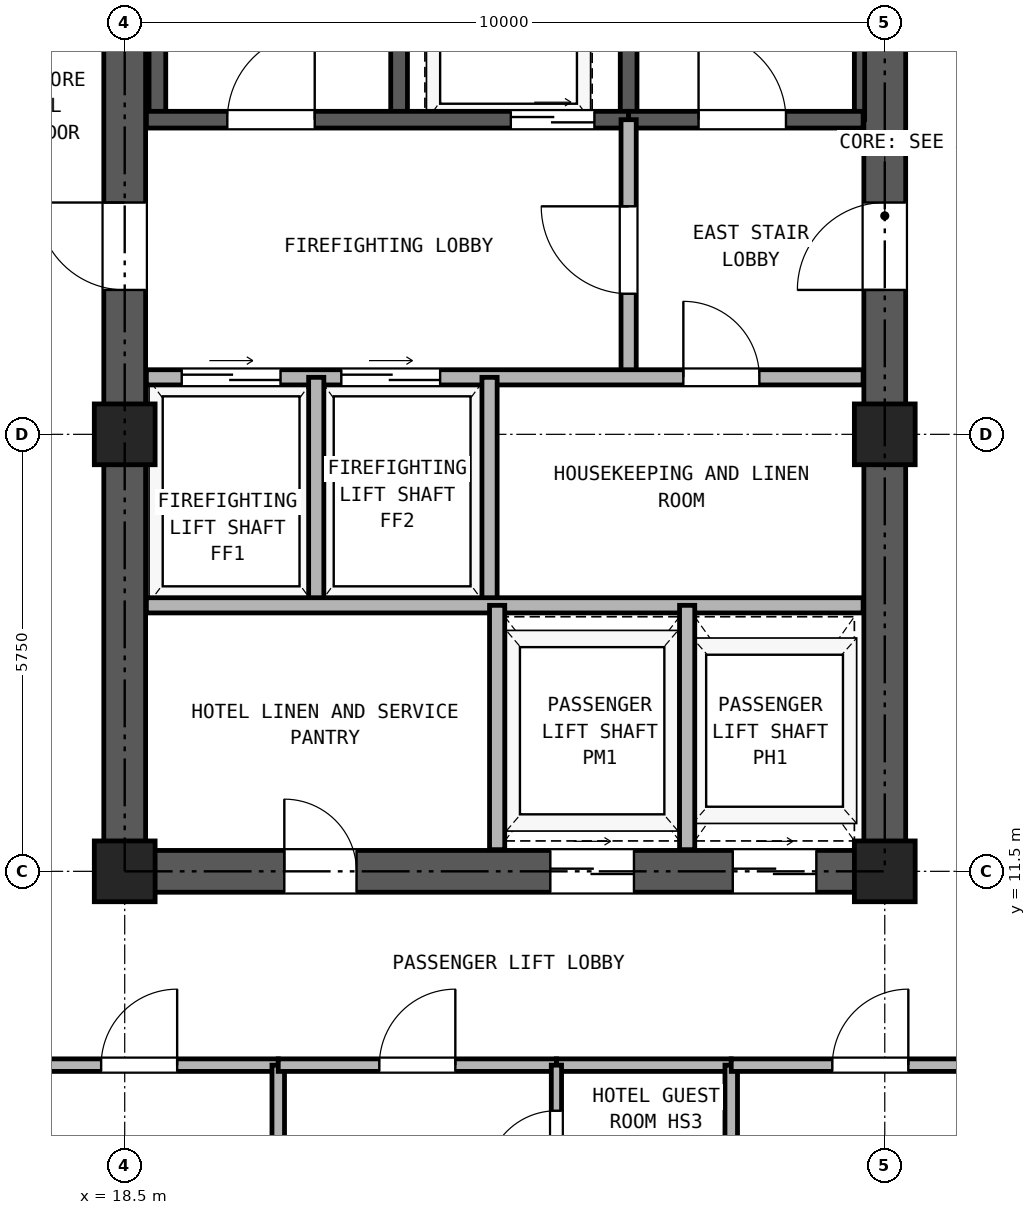
"""IFC4 building model, lengths in metres.
Left out: names, types, materials, properties, quantities, classifications, styles, units other than length and angle.
Written with IfcOpenShell. Run it as: python <this file> out.ifc"""

import sys

from ifc_helpers import new_model, si_unit, direction, frame, frame_2d, origin, origin_2d, place, context, subcontext, project, spatial, rectangle, hollow_rectangle, extrude, source, transform, mapped, element, fill, save


model = new_model("IFC4")
c1 = context("Model", 3, precision=1e-05, world=origin(), true_north=direction((0.0, 1.0)))
c2 = subcontext(c1, "Body", "Model", "MODEL_VIEW")
j1 = project(units=[si_unit("LENGTHUNIT", "METRE"), si_unit("PLANEANGLEUNIT", "RADIAN")], contexts=[c1])
p1 = place(None, origin())
s1 = spatial("IfcSite", under=j1, at=p1, CompositionType="ELEMENT")
p2 = place(p1, origin())
s2 = spatial("IfcBuilding", under=s1, at=p2, CompositionType="ELEMENT")
p3 = place(p2, frame((0.0, 0.0, 115.1)))
s3 = spatial("IfcBuildingStorey", under=s2, at=p3, CompositionType="ELEMENT", Elevation=115.1)
m1 = source(origin(), c2, "Body", "SweptSolid", [
    extrude(hollow_rectangle(XDim=0.8, YDim=0.8, WallThickness=0.045, at=origin_2d()), origin(), (0.0, 0.0, 1.0), 2.95),
])
for number, where, z_axis, x_axis in (
    (1, (18.5, 11.5, 0.0), (0.0, 0.0, 1.0), (1.0, 0.0, 0.0)),
    (2, (18.5, 17.25, 0.0), (0.0, 0.0, 1.0), (1.0, 0.0, 0.0)),
    (3, (28.5, 11.5, 0.0), (0.0, 0.0, 1.0), (1.0, 0.0, 0.0)),
    (4, (28.5, 17.25, 0.0), (0.0, 0.0, 1.0), (1.0, 0.0, 0.0)),
):
    element("IfcColumn", number, at=place(p3, frame(where, z_axis=z_axis, x_axis=x_axis)), inside=s3, PredefinedType="COLUMN", context=c2, shape_type="MappedRepresentation", body=[
        mapped(m1, transform((0.0, 0.0, 0.0), x_axis=(1.0, 0.0, 0.0), y_axis=(0.0, 1.0, 0.0), z_axis=(0.0, 0.0, 1.0), scale=1.0)),
    ])
p4 = place(p3, frame((18.225, 11.5, 0.0), z_axis=(0.0, 0.0, 1.0), x_axis=(1.0, 0.0, 0.0)))
e5 = element("IfcWall", 5, at=p4, inside=s3, PredefinedType="SHEAR", context=c2, shape_type="SweptSolid", body=[
    extrude(rectangle(XDim=10.55, YDim=0.55, at=frame_2d((5.275, 0.0))), origin(), (0.0, 0.0, 1.0), 2.95),
])
p5 = place(p4, frame((2.375, 0.0, 0.0)))
e6 = element("IfcOpeningElement", 6, at=p5, cuts=e5, PredefinedType="OPENING", context=c2, shape_type="SweptSolid", body=[
    extrude(rectangle(XDim=0.95, YDim=2.15, at=frame_2d((0.475, 1.075))), frame((0.0, 0.285, 0.0), z_axis=(0.0, -1.0, 0.0), x_axis=(1.0, 0.0, 0.0)), (0.0, 0.0, 1.0), 0.57),
])
p6 = place(p4, frame((5.875, 0.0, 0.0)))
e7 = element("IfcOpeningElement", 7, at=p6, cuts=e5, PredefinedType="OPENING", context=c2, shape_type="SweptSolid", body=[
    extrude(rectangle(XDim=1.1, YDim=2.25, at=frame_2d((0.55, 1.125))), frame((0.0, 0.285, 0.0), z_axis=(0.0, -1.0, 0.0), x_axis=(1.0, 0.0, 0.0)), (0.0, 0.0, 1.0), 0.57),
])
p7 = place(p4, frame((8.275, 0.0, 0.0)))
e8 = element("IfcOpeningElement", 8, at=p7, cuts=e5, PredefinedType="OPENING", context=c2, shape_type="SweptSolid", body=[
    extrude(rectangle(XDim=1.1, YDim=2.25, at=frame_2d((0.55, 1.125))), frame((0.0, 0.285, 0.0), z_axis=(0.0, -1.0, 0.0), x_axis=(1.0, 0.0, 0.0)), (0.0, 0.0, 1.0), 0.57),
])
p8 = place(p3, frame((18.5, 11.775, 0.0), z_axis=(0.0, 0.0, 1.0), x_axis=(0.0, 1.0, 0.0)))
e9 = element("IfcWall", 9, at=p8, inside=s3, PredefinedType="SHEAR", context=c2, shape_type="SweptSolid", body=[
    extrude(rectangle(XDim=16.7, YDim=0.55, at=frame_2d((8.35, 0.0))), origin(), (0.0, 0.0, 1.0), 2.95),
])
p9 = place(p8, frame((7.375, 0.0, 0.0)))
e10 = element("IfcOpeningElement", 10, at=p9, cuts=e9, PredefinedType="OPENING", context=c2, shape_type="SweptSolid", body=[
    extrude(rectangle(XDim=1.15, YDim=2.2, at=frame_2d((0.575, 1.1))), frame((0.0, 0.285, 0.0), z_axis=(0.0, -1.0, 0.0), x_axis=(1.0, 0.0, 0.0)), (0.0, 0.0, 1.0), 0.57),
])
p10 = place(p3, frame((28.5, 11.775, 0.0), z_axis=(0.0, 0.0, 1.0), x_axis=(0.0, 1.0, 0.0)))
e11 = element("IfcWall", 11, at=p10, inside=s3, PredefinedType="SHEAR", context=c2, shape_type="SweptSolid", body=[
    extrude(rectangle(XDim=16.7, YDim=0.55, at=frame_2d((8.35, 0.0))), origin(), (0.0, 0.0, 1.0), 2.95),
])
p11 = place(p10, frame((7.375, 0.0, 0.0)))
e12 = element("IfcOpeningElement", 12, at=p11, cuts=e11, PredefinedType="OPENING", context=c2, shape_type="SweptSolid", body=[
    extrude(rectangle(XDim=1.15, YDim=2.2, at=frame_2d((0.575, 1.1))), frame((0.0, 0.285, 0.0), z_axis=(0.0, -1.0, 0.0), x_axis=(1.0, 0.0, 0.0)), (0.0, 0.0, 1.0), 0.57),
])
for number, where, z_axis, x_axis in (
    (13, (18.93, 21.39, 0.0), (0.0, 0.0, 1.0), (0.0, 1.0, 0.0)),
    (14, (22.11, 21.39, 0.0), (0.0, 0.0, 1.0), (0.0, 1.0, 0.0)),
    (15, (25.13, 21.39, 0.0), (0.0, 0.0, 1.0), (0.0, 1.0, 0.0)),
):
    element("IfcWall", number, at=place(p3, frame(where, z_axis=z_axis, x_axis=x_axis)), inside=s3, PredefinedType="SOLIDWALL", context=c2, shape_type="SweptSolid", body=[
        extrude(rectangle(XDim=7.11, YDim=0.22, at=frame_2d((3.555, 0.0))), origin(), (0.0, 0.0, 1.0), 2.95),
    ])
p12 = place(p3, frame((28.167, 21.39, 0.0), z_axis=(0.0, 0.0, 1.0), x_axis=(0.0, 1.0, 0.0)))
e16 = element("IfcWall", 16, at=p12, inside=s3, PredefinedType="PARTITIONING", context=c2, shape_type="SweptSolid", body=[
    extrude(rectangle(XDim=6.945, YDim=0.135, at=frame_2d((3.473, 0.0))), origin(), (0.0, 0.0, 1.0), 2.95),
])
p13 = place(p3, frame((18.785, 21.39, 0.0), z_axis=(0.0, 0.0, 1.0), x_axis=(1.0, 0.0, 0.0)))
e17 = element("IfcWall", 17, at=p13, inside=s3, PredefinedType="SOLIDWALL", context=c2, shape_type="SweptSolid", body=[
    extrude(rectangle(XDim=6.345, YDim=0.22, at=frame_2d((3.172, 0.0))), origin(), (0.0, 0.0, 1.0), 2.95),
])
p14 = place(p13, frame((1.065, 0.0, 0.0)))
e18 = element("IfcOpeningElement", 18, at=p14, cuts=e17, PredefinedType="OPENING", context=c2, shape_type="SweptSolid", body=[
    extrude(rectangle(XDim=1.15, YDim=2.2, at=frame_2d((0.575, 1.1))), frame((0.0, 0.12, 0.0), z_axis=(0.0, -1.0, 0.0), x_axis=(1.0, 0.0, 0.0)), (0.0, 0.0, 1.0), 0.24),
])
p15 = place(p13, frame((4.795, 0.0, 0.0)))
e19 = element("IfcOpeningElement", 19, at=p15, cuts=e17, PredefinedType="OPENING", context=c2, shape_type="SweptSolid", body=[
    extrude(rectangle(XDim=1.1, YDim=2.25, at=frame_2d((0.55, 1.125))), frame((0.0, 0.12, 0.0), z_axis=(0.0, -1.0, 0.0), x_axis=(1.0, 0.0, 0.0)), (0.0, 0.0, 1.0), 0.24),
])
p16 = place(p3, frame((25.13, 21.39, 0.0), z_axis=(0.0, 0.0, 1.0), x_axis=(1.0, 0.0, 0.0)))
e20 = element("IfcWall", 20, at=p16, inside=s3, PredefinedType="SOLIDWALL", context=c2, shape_type="SweptSolid", body=[
    extrude(rectangle(XDim=3.085, YDim=0.22, at=frame_2d((1.542, 0.0))), origin(), (0.0, 0.0, 1.0), 2.95),
])
p17 = place(p16, frame((0.92, 0.0, 0.0)))
e21 = element("IfcOpeningElement", 21, at=p17, cuts=e20, PredefinedType="OPENING", context=c2, shape_type="SweptSolid", body=[
    extrude(rectangle(XDim=1.15, YDim=2.2, at=frame_2d((0.575, 1.1))), frame((0.0, 0.12, 0.0), z_axis=(0.0, -1.0, 0.0), x_axis=(1.0, 0.0, 0.0)), (0.0, 0.0, 1.0), 0.24),
])
p18 = place(p3, frame((25.13, 18.0, 0.0), z_axis=(0.0, 0.0, 1.0), x_axis=(0.0, 1.0, 0.0)))
e22 = element("IfcWall", 22, at=p18, inside=s3, PredefinedType="PARTITIONING", context=c2, shape_type="SweptSolid", body=[
    extrude(rectangle(XDim=3.39, YDim=0.2, at=frame_2d((1.695, 0.0))), origin(), (0.0, 0.0, 1.0), 2.95),
])
p19 = place(p18, frame((1.1, 0.0, 0.0)))
e23 = element("IfcOpeningElement", 23, at=p19, cuts=e22, PredefinedType="OPENING", context=c2, shape_type="SweptSolid", body=[
    extrude(rectangle(XDim=1.15, YDim=2.2, at=frame_2d((0.575, 1.1))), frame((0.0, 0.11, 0.0), z_axis=(0.0, -1.0, 0.0), x_axis=(1.0, 0.0, 0.0)), (0.0, 0.0, 1.0), 0.22),
])
p20 = place(p3, frame((18.785, 18.0, 0.0), z_axis=(0.0, 0.0, 1.0), x_axis=(1.0, 0.0, 0.0)))
e24 = element("IfcWall", 24, at=p20, inside=s3, PredefinedType="PARTITIONING", context=c2, shape_type="SweptSolid", body=[
    extrude(rectangle(XDim=9.43, YDim=0.2, at=frame_2d((4.715, 0.0))), origin(), (0.0, 0.0, 1.0), 2.95),
])
p21 = place(p20, frame((0.465, 0.0, 0.0)))
e25 = element("IfcOpeningElement", 25, at=p21, cuts=e24, PredefinedType="OPENING", context=c2, shape_type="SweptSolid", body=[
    extrude(rectangle(XDim=1.3, YDim=2.3, at=frame_2d((0.65, 1.15))), frame((0.0, 0.11, 0.0), z_axis=(0.0, -1.0, 0.0), x_axis=(1.0, 0.0, 0.0)), (0.0, 0.0, 1.0), 0.22),
])
p22 = place(p20, frame((2.565, 0.0, 0.0)))
e26 = element("IfcOpeningElement", 26, at=p22, cuts=e24, PredefinedType="OPENING", context=c2, shape_type="SweptSolid", body=[
    extrude(rectangle(XDim=1.3, YDim=2.3, at=frame_2d((0.65, 1.15))), frame((0.0, 0.11, 0.0), z_axis=(0.0, -1.0, 0.0), x_axis=(1.0, 0.0, 0.0)), (0.0, 0.0, 1.0), 0.22),
])
p23 = place(p20, frame((7.065, 0.0, 0.0)))
e27 = element("IfcOpeningElement", 27, at=p23, cuts=e24, PredefinedType="OPENING", context=c2, shape_type="SweptSolid", body=[
    extrude(rectangle(XDim=1.0, YDim=2.15, at=frame_2d((0.5, 1.075))), frame((0.0, 0.11, 0.0), z_axis=(0.0, -1.0, 0.0), x_axis=(1.0, 0.0, 0.0)), (0.0, 0.0, 1.0), 0.22),
])
for number, where, z_axis, x_axis in (
    (28, (21.02, 15.0, 0.0), (0.0, 0.0, 1.0), (0.0, 1.0, 0.0)),
    (29, (23.3, 15.0, 0.0), (0.0, 0.0, 1.0), (0.0, 1.0, 0.0)),
):
    element("IfcWall", number, at=place(p3, frame(where, z_axis=z_axis, x_axis=x_axis)), inside=s3, PredefinedType="PARTITIONING", context=c2, shape_type="SweptSolid", body=[
        extrude(rectangle(XDim=3.0, YDim=0.2, at=frame_2d((1.5, 0.0))), origin(), (0.0, 0.0, 1.0), 2.95),
    ])
p24 = place(p3, frame((18.785, 15.0, 0.0), z_axis=(0.0, 0.0, 1.0), x_axis=(1.0, 0.0, 0.0)))
e30 = element("IfcWall", 30, at=p24, inside=s3, PredefinedType="PARTITIONING", context=c2, shape_type="SweptSolid", body=[
    extrude(rectangle(XDim=9.43, YDim=0.2, at=frame_2d((4.715, 0.0))), origin(), (0.0, 0.0, 1.0), 2.95),
])
for number, where, z_axis, x_axis in (
    (31, (23.4, 11.785, 0.0), (0.0, 0.0, 1.0), (0.0, 1.0, 0.0)),
    (32, (25.9, 11.785, 0.0), (0.0, 0.0, 1.0), (0.0, 1.0, 0.0)),
):
    element("IfcWall", number, at=place(p3, frame(where, z_axis=z_axis, x_axis=x_axis)), inside=s3, PredefinedType="PARTITIONING", context=c2, shape_type="SweptSolid", body=[
        extrude(rectangle(XDim=3.215, YDim=0.2, at=frame_2d((1.607, 0.0))), origin(), (0.0, 0.0, 1.0), 2.95),
    ])
p25 = place(p3, frame((16.86, 8.95, 0.0), z_axis=(0.0, 0.0, 1.0), x_axis=(1.0, 0.0, 0.0)))
e33 = element("IfcWall", 33, at=p25, inside=s3, PredefinedType="PARTITIONING", context=c2, shape_type="SweptSolid", body=[
    extrude(rectangle(XDim=3.66, YDim=0.165, at=frame_2d((1.83, 0.0))), origin(), (0.0, 0.0, 1.0), 2.95),
])
p26 = place(p25, frame((1.33, 0.0, 0.0)))
e34 = element("IfcOpeningElement", 34, at=p26, cuts=e33, PredefinedType="OPENING", context=c2, shape_type="SweptSolid", body=[
    extrude(rectangle(XDim=1.0, YDim=2.15, at=frame_2d((0.5, 1.075))), frame((0.0, 0.093, 0.0), z_axis=(0.0, -1.0, 0.0), x_axis=(1.0, 0.0, 0.0)), (0.0, 0.0, 1.0), 0.185),
])
p27 = place(p3, frame((20.52, 0.16, 0.0), z_axis=(0.0, 0.0, 1.0), x_axis=(0.0, 1.0, 0.0)))
e35 = element("IfcWall", 35, at=p27, inside=s3, PredefinedType="PARTITIONING", context=c2, shape_type="SweptSolid", body=[
    extrude(rectangle(XDim=8.79, YDim=0.165, at=frame_2d((4.395, 0.0))), origin(), (0.0, 0.0, 1.0), 2.95),
])
p28 = place(p3, frame((24.18, 8.95, 0.0), z_axis=(0.0, 0.0, 1.0), x_axis=(1.0, 0.0, 0.0)))
e36 = element("IfcWall", 36, at=p28, inside=s3, PredefinedType="PARTITIONING", context=c2, shape_type="SweptSolid", body=[
    extrude(rectangle(XDim=2.3, YDim=0.165, at=frame_2d((1.15, 0.0))), origin(), (0.0, 0.0, 1.0), 2.95),
])
p29 = place(p3, frame((20.52, 8.95, 0.0), z_axis=(0.0, 0.0, 1.0), x_axis=(1.0, 0.0, 0.0)))
e37 = element("IfcWall", 37, at=p29, inside=s3, PredefinedType="PARTITIONING", context=c2, shape_type="SweptSolid", body=[
    extrude(rectangle(XDim=3.66, YDim=0.165, at=frame_2d((1.83, 0.0))), origin(), (0.0, 0.0, 1.0), 2.95),
])
p30 = place(p29, frame((1.33, 0.0, 0.0)))
e38 = element("IfcOpeningElement", 38, at=p30, cuts=e37, PredefinedType="OPENING", context=c2, shape_type="SweptSolid", body=[
    extrude(rectangle(XDim=1.0, YDim=2.15, at=frame_2d((0.5, 1.075))), frame((0.0, 0.093, 0.0), z_axis=(0.0, -1.0, 0.0), x_axis=(1.0, 0.0, 0.0)), (0.0, 0.0, 1.0), 0.185),
])
p31 = place(p3, frame((24.18, 6.85, 0.0), z_axis=(0.0, 0.0, 1.0), x_axis=(0.0, 1.0, 0.0)))
e39 = element("IfcWall", 39, at=p31, inside=s3, PredefinedType="PARTITIONING", context=c2, shape_type="SweptSolid", body=[
    extrude(rectangle(XDim=2.1, YDim=0.135, at=frame_2d((1.05, 0.0))), origin(), (0.0, 0.0, 1.0), 2.95),
])
p32 = place(p31, frame((0.58, 0.0, 0.0)))
e40 = element("IfcOpeningElement", 40, at=p32, cuts=e39, PredefinedType="OPENING", context=c2, shape_type="SweptSolid", body=[
    extrude(rectangle(XDim=0.92, YDim=2.1, at=frame_2d((0.46, 1.05))), frame((0.0, 0.077, 0.0), z_axis=(0.0, -1.0, 0.0), x_axis=(1.0, 0.0, 0.0)), (0.0, 0.0, 1.0), 0.155),
])
p33 = place(p3, frame((26.48, 0.16, 0.0), z_axis=(0.0, 0.0, 1.0), x_axis=(0.0, 1.0, 0.0)))
e41 = element("IfcWall", 41, at=p33, inside=s3, PredefinedType="PARTITIONING", context=c2, shape_type="SweptSolid", body=[
    extrude(rectangle(XDim=8.79, YDim=0.165, at=frame_2d((4.395, 0.0))), origin(), (0.0, 0.0, 1.0), 2.95),
])
p34 = place(p3, frame((26.48, 8.95, 0.0), z_axis=(0.0, 0.0, 1.0), x_axis=(1.0, 0.0, 0.0)))
e42 = element("IfcWall", 42, at=p34, inside=s3, PredefinedType="PARTITIONING", context=c2, shape_type="SweptSolid", body=[
    extrude(rectangle(XDim=3.66, YDim=0.165, at=frame_2d((1.83, 0.0))), origin(), (0.0, 0.0, 1.0), 2.95),
])
p35 = place(p34, frame((1.33, 0.0, 0.0)))
e43 = element("IfcOpeningElement", 43, at=p35, cuts=e42, PredefinedType="OPENING", context=c2, shape_type="SweptSolid", body=[
    extrude(rectangle(XDim=1.0, YDim=2.15, at=frame_2d((0.5, 1.075))), frame((0.0, 0.093, 0.0), z_axis=(0.0, -1.0, 0.0), x_axis=(1.0, 0.0, 0.0)), (0.0, 0.0, 1.0), 0.185),
])
p36 = place(p14, frame((1.15, 0.0, 0.0), z_axis=(0.0, 0.0, 1.0), x_axis=(-1.0, 0.0, 0.0)))
e44 = element("IfcDoor", 44, at=p36, inside=s3, OperationType="SINGLE_SWING_RIGHT", PredefinedType="DOOR", context=c2, shape_type="SweptSolid", body=[
    extrude(rectangle(XDim=1.15, YDim=2.2, at=frame_2d((0.575, 1.1))), frame((0.0, 0.025, 0.0), z_axis=(0.0, -1.0, 0.0), x_axis=(1.0, 0.0, 0.0)), (0.0, 0.0, 1.0), 0.05),
])
fill(e18, e44)
p37 = place(p17, frame((1.15, 0.0, 0.0), z_axis=(0.0, 0.0, 1.0), x_axis=(-1.0, 0.0, 0.0)))
e45 = element("IfcDoor", 45, at=p37, inside=s3, OperationType="SINGLE_SWING_LEFT", PredefinedType="DOOR", context=c2, shape_type="SweptSolid", body=[
    extrude(rectangle(XDim=1.15, YDim=2.2, at=frame_2d((0.575, 1.1))), frame((0.0, 0.025, 0.0), z_axis=(0.0, -1.0, 0.0), x_axis=(1.0, 0.0, 0.0)), (0.0, 0.0, 1.0), 0.05),
])
fill(e21, e45)
p38 = place(p15, frame((1.1, 0.0, 0.0), z_axis=(0.0, 0.0, 1.0), x_axis=(-1.0, 0.0, 0.0)))
e46 = element("IfcDoor", 46, at=p38, inside=s3, OperationType="DOUBLE_DOOR_SLIDING", PredefinedType="DOOR", context=c2, shape_type="SweptSolid", body=[
    extrude(rectangle(XDim=1.1, YDim=2.25, at=frame_2d((0.55, 1.125))), frame((0.0, 0.025, 0.0), z_axis=(0.0, -1.0, 0.0), x_axis=(1.0, 0.0, 0.0)), (0.0, 0.0, 1.0), 0.05),
])
fill(e19, e46)
p39 = place(p19, origin())
e47 = element("IfcDoor", 47, at=p39, inside=s3, OperationType="SINGLE_SWING_RIGHT", PredefinedType="DOOR", context=c2, shape_type="SweptSolid", body=[
    extrude(rectangle(XDim=1.15, YDim=2.2, at=frame_2d((0.575, 1.1))), frame((0.0, 0.025, 0.0), z_axis=(0.0, -1.0, 0.0), x_axis=(1.0, 0.0, 0.0)), (0.0, 0.0, 1.0), 0.05),
])
fill(e23, e47)
p40 = place(p21, origin())
e48 = element("IfcDoor", 48, at=p40, inside=s3, OperationType="DOUBLE_DOOR_SLIDING", PredefinedType="DOOR", context=c2, shape_type="SweptSolid", body=[
    extrude(rectangle(XDim=1.3, YDim=2.3, at=frame_2d((0.65, 1.15))), frame((0.0, 0.025, 0.0), z_axis=(0.0, -1.0, 0.0), x_axis=(1.0, 0.0, 0.0)), (0.0, 0.0, 1.0), 0.05),
])
fill(e25, e48)
p41 = place(p22, origin())
e49 = element("IfcDoor", 49, at=p41, inside=s3, OperationType="DOUBLE_DOOR_SLIDING", PredefinedType="DOOR", context=c2, shape_type="SweptSolid", body=[
    extrude(rectangle(XDim=1.3, YDim=2.3, at=frame_2d((0.65, 1.15))), frame((0.0, 0.025, 0.0), z_axis=(0.0, -1.0, 0.0), x_axis=(1.0, 0.0, 0.0)), (0.0, 0.0, 1.0), 0.05),
])
fill(e26, e49)
p42 = place(p23, frame((1.0, 0.0, 0.0), z_axis=(0.0, 0.0, 1.0), x_axis=(-1.0, 0.0, 0.0)))
e50 = element("IfcDoor", 50, at=p42, inside=s3, OperationType="SINGLE_SWING_LEFT", PredefinedType="DOOR", context=c2, shape_type="SweptSolid", body=[
    extrude(rectangle(XDim=1.0, YDim=2.15, at=frame_2d((0.5, 1.075))), frame((0.0, 0.025, 0.0), z_axis=(0.0, -1.0, 0.0), x_axis=(1.0, 0.0, 0.0)), (0.0, 0.0, 1.0), 0.05),
])
fill(e27, e50)
p43 = place(p9, frame((1.15, 0.0, 0.0), z_axis=(0.0, 0.0, 1.0), x_axis=(-1.0, 0.0, 0.0)))
e51 = element("IfcDoor", 51, at=p43, inside=s3, OperationType="SINGLE_SWING_RIGHT", PredefinedType="DOOR", context=c2, shape_type="SweptSolid", body=[
    extrude(rectangle(XDim=1.15, YDim=2.2, at=frame_2d((0.575, 1.1))), frame((0.0, 0.025, 0.0), z_axis=(0.0, -1.0, 0.0), x_axis=(1.0, 0.0, 0.0)), (0.0, 0.0, 1.0), 0.05),
])
fill(e10, e51)
p44 = place(p11, origin())
e52 = element("IfcDoor", 52, at=p44, inside=s3, OperationType="SINGLE_SWING_LEFT", PredefinedType="DOOR", context=c2, shape_type="SweptSolid", body=[
    extrude(rectangle(XDim=1.15, YDim=2.2, at=frame_2d((0.575, 1.1))), frame((0.0, 0.025, 0.0), z_axis=(0.0, -1.0, 0.0), x_axis=(1.0, 0.0, 0.0)), (0.0, 0.0, 1.0), 0.05),
])
fill(e12, e52)
p45 = place(p5, frame((0.95, 0.0, 0.0), z_axis=(0.0, 0.0, 1.0), x_axis=(-1.0, 0.0, 0.0)))
e53 = element("IfcDoor", 53, at=p45, inside=s3, OperationType="SINGLE_SWING_LEFT", PredefinedType="DOOR", context=c2, shape_type="SweptSolid", body=[
    extrude(rectangle(XDim=0.95, YDim=2.15, at=frame_2d((0.475, 1.075))), frame((0.0, 0.025, 0.0), z_axis=(0.0, -1.0, 0.0), x_axis=(1.0, 0.0, 0.0)), (0.0, 0.0, 1.0), 0.05),
])
fill(e6, e53)
p46 = place(p6, frame((1.1, 0.0, 0.0), z_axis=(0.0, 0.0, 1.0), x_axis=(-1.0, 0.0, 0.0)))
e54 = element("IfcDoor", 54, at=p46, inside=s3, OperationType="DOUBLE_DOOR_SLIDING", PredefinedType="DOOR", context=c2, shape_type="SweptSolid", body=[
    extrude(rectangle(XDim=1.1, YDim=2.25, at=frame_2d((0.55, 1.125))), frame((0.0, 0.025, 0.0), z_axis=(0.0, -1.0, 0.0), x_axis=(1.0, 0.0, 0.0)), (0.0, 0.0, 1.0), 0.05),
])
fill(e7, e54)
p47 = place(p7, frame((1.1, 0.0, 0.0), z_axis=(0.0, 0.0, 1.0), x_axis=(-1.0, 0.0, 0.0)))
e55 = element("IfcDoor", 55, at=p47, inside=s3, OperationType="DOUBLE_DOOR_SLIDING", PredefinedType="DOOR", context=c2, shape_type="SweptSolid", body=[
    extrude(rectangle(XDim=1.1, YDim=2.25, at=frame_2d((0.55, 1.125))), frame((0.0, 0.025, 0.0), z_axis=(0.0, -1.0, 0.0), x_axis=(1.0, 0.0, 0.0)), (0.0, 0.0, 1.0), 0.05),
])
fill(e8, e55)
p48 = place(p26, frame((1.0, 0.0, 0.0), z_axis=(0.0, 0.0, 1.0), x_axis=(-1.0, 0.0, 0.0)))
e56 = element("IfcDoor", 56, at=p48, inside=s3, OperationType="SINGLE_SWING_RIGHT", PredefinedType="DOOR", context=c2, shape_type="SweptSolid", body=[
    extrude(rectangle(XDim=1.0, YDim=2.15, at=frame_2d((0.5, 1.075))), frame((0.0, 0.025, 0.0), z_axis=(0.0, -1.0, 0.0), x_axis=(1.0, 0.0, 0.0)), (0.0, 0.0, 1.0), 0.05),
])
fill(e34, e56)
p49 = place(p32, origin())
e57 = element("IfcDoor", 57, at=p49, inside=s3, OperationType="SINGLE_SWING_LEFT", PredefinedType="DOOR", context=c2, shape_type="SweptSolid", body=[
    extrude(rectangle(XDim=0.92, YDim=2.1, at=frame_2d((0.46, 1.05))), frame((0.0, 0.025, 0.0), z_axis=(0.0, -1.0, 0.0), x_axis=(1.0, 0.0, 0.0)), (0.0, 0.0, 1.0), 0.05),
])
fill(e40, e57)
p50 = place(p30, frame((1.0, 0.0, 0.0), z_axis=(0.0, 0.0, 1.0), x_axis=(-1.0, 0.0, 0.0)))
e58 = element("IfcDoor", 58, at=p50, inside=s3, OperationType="SINGLE_SWING_RIGHT", PredefinedType="DOOR", context=c2, shape_type="SweptSolid", body=[
    extrude(rectangle(XDim=1.0, YDim=2.15, at=frame_2d((0.5, 1.075))), frame((0.0, 0.025, 0.0), z_axis=(0.0, -1.0, 0.0), x_axis=(1.0, 0.0, 0.0)), (0.0, 0.0, 1.0), 0.05),
])
fill(e38, e58)
p51 = place(p35, frame((1.0, 0.0, 0.0), z_axis=(0.0, 0.0, 1.0), x_axis=(-1.0, 0.0, 0.0)))
e59 = element("IfcDoor", 59, at=p51, inside=s3, OperationType="SINGLE_SWING_RIGHT", PredefinedType="DOOR", context=c2, shape_type="SweptSolid", body=[
    extrude(rectangle(XDim=1.0, YDim=2.15, at=frame_2d((0.5, 1.075))), frame((0.0, 0.025, 0.0), z_axis=(0.0, -1.0, 0.0), x_axis=(1.0, 0.0, 0.0)), (0.0, 0.0, 1.0), 0.05),
])
fill(e43, e59)
save(model, sys.argv[1])
